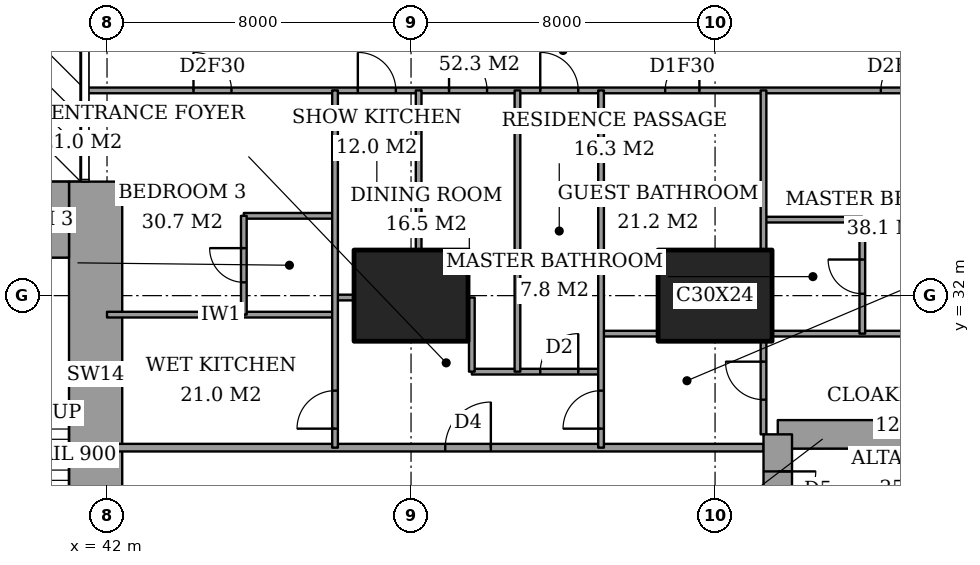
"""IFC4 building model, lengths in metres.
Left out: names, types, materials, properties, quantities, classifications, styles, units other than length and angle.
Written with IfcOpenShell. Run it as: python <this file> out.ifc"""

import sys

from ifc_helpers import new_model, si_unit, direction, frame, frame_2d, origin, origin_2d, place, context, subcontext, project, spatial, rectangle, extrude, element, fill, save


model = new_model("IFC4")
c1 = context("Model", 3, precision=1e-05, world=origin(), true_north=direction((0.0, 1.0)))
c2 = subcontext(c1, "Body", "Model", "MODEL_VIEW")
j1 = project(units=[si_unit("LENGTHUNIT", "METRE"), si_unit("PLANEANGLEUNIT", "RADIAN")], contexts=[c1])
p1 = place(None, origin())
s1 = spatial("IfcSite", under=j1, at=p1, CompositionType="ELEMENT")
p2 = place(p1, origin())
s2 = spatial("IfcBuilding", under=s1, at=p2, CompositionType="ELEMENT")
p3 = place(p2, frame((0.0, 0.0, 96.2)))
s3 = spatial("IfcBuildingStorey", under=s2, at=p3, CompositionType="ELEMENT", Elevation=96.2)
for number, where, z_axis, x_axis in (
    (1, (50.0, 32.0, 0.0), (0.0, 0.0, 1.0), (1.0, 0.0, 0.0)),
    (2, (58.0, 32.0, 0.0), (0.0, 0.0, 1.0), (1.0, 0.0, 0.0)),
):
    element("IfcColumn", number, at=place(p3, frame(where, z_axis=z_axis, x_axis=x_axis)), inside=s3, PredefinedType="COLUMN", context=c2, shape_type="SweptSolid", body=[
        extrude(rectangle(XDim=3.0, YDim=2.4, at=origin_2d()), origin(), (0.0, 0.0, 1.0), 3.6),
    ])
p4 = place(p3, frame((37.85, 34.0, 0.0), z_axis=(0.0, 0.0, 1.0), x_axis=(1.0, 0.0, 0.0)))
e3 = element("IfcWall", 3, at=p4, inside=s3, PredefinedType="SHEAR", context=c2, shape_type="SweptSolid", body=[
    extrude(rectangle(XDim=3.15, YDim=2.0, at=frame_2d((1.575, 0.0))), origin(), (0.0, 0.0, 1.0), 3.6),
])
p5 = place(p3, frame((41.7, 24.85, 0.0), z_axis=(0.0, 0.0, 1.0), x_axis=(0.0, 1.0, 0.0)))
e4 = element("IfcWall", 4, at=p5, inside=s3, PredefinedType="SHEAR", context=c2, shape_type="SweptSolid", body=[
    extrude(rectangle(XDim=10.15, YDim=1.4, at=frame_2d((5.075, 0.0))), origin(), (0.0, 0.0, 1.0), 3.6),
])
p6 = place(p3, frame((64.1, 28.35, 0.0), z_axis=(0.0, 0.0, 1.0), x_axis=(-1.0, 0.0, 0.0)))
e5 = element("IfcWall", 5, at=p6, inside=s3, PredefinedType="SHEAR", context=c2, shape_type="SweptSolid", body=[
    extrude(rectangle(XDim=4.45, YDim=0.75, at=frame_2d((2.225, 0.0))), origin(), (0.0, 0.0, 1.0), 3.6),
])
p7 = place(p3, frame((59.65, 28.35, 0.0), z_axis=(0.0, 0.0, 1.0), x_axis=(0.0, -1.0, 0.0)))
e6 = element("IfcWall", 6, at=p7, inside=s3, PredefinedType="SHEAR", context=c2, shape_type="SweptSolid", body=[
    extrude(rectangle(XDim=8.7, YDim=0.75, at=frame_2d((4.35, 0.0))), origin(), (0.0, 0.0, 1.0), 3.6),
])
p8 = place(p7, frame((0.975, 0.0, 0.0)))
e7 = element("IfcOpeningElement", 7, at=p8, cuts=e6, PredefinedType="OPENING", context=c2, shape_type="SweptSolid", body=[
    extrude(rectangle(XDim=1.0, YDim=2.1, at=frame_2d((0.5, 1.05))), frame((0.0, 0.385, 0.0), z_axis=(0.0, -1.0, 0.0), x_axis=(1.0, 0.0, 0.0)), (0.0, 0.0, 1.0), 0.77),
])
p9 = place(p3, frame((42.0, 28.0, 0.0), z_axis=(0.0, 0.0, 1.0), x_axis=(1.0, 0.0, 0.0)))
e8 = element("IfcWall", 8, at=p9, inside=s3, PredefinedType="PARTITIONING", context=c2, shape_type="SweptSolid", body=[
    extrude(rectangle(XDim=17.275, YDim=0.2, at=frame_2d((8.637, 0.0))), origin(), (0.0, 0.0, 1.0), 3.35),
])
p10 = place(p9, frame((8.9, 0.0, 0.0)))
e9 = element("IfcOpeningElement", 9, at=p10, cuts=e8, PredefinedType="OPENING", context=c2, shape_type="SweptSolid", body=[
    extrude(rectangle(XDim=1.2, YDim=2.4, at=frame_2d((0.6, 1.2))), frame((0.0, 0.11, 0.0), z_axis=(0.0, -1.0, 0.0), x_axis=(1.0, 0.0, 0.0)), (0.0, 0.0, 1.0), 0.22),
])
p11 = place(p3, frame((51.6, 30.0, 0.0), z_axis=(0.0, 0.0, 1.0), x_axis=(1.0, 0.0, 0.0)))
e10 = element("IfcWall", 10, at=p11, inside=s3, PredefinedType="PARTITIONING", context=c2, shape_type="SweptSolid", body=[
    extrude(rectangle(XDim=3.4, YDim=0.15, at=frame_2d((1.7, 0.0))), origin(), (0.0, 0.0, 1.0), 3.35),
])
p12 = place(p11, frame((1.8, 0.0, 0.0)))
e11 = element("IfcOpeningElement", 11, at=p12, cuts=e10, PredefinedType="OPENING", context=c2, shape_type="SweptSolid", body=[
    extrude(rectangle(XDim=1.0, YDim=2.1, at=frame_2d((0.5, 1.05))), frame((0.0, 0.085, 0.0), z_axis=(0.0, -1.0, 0.0), x_axis=(1.0, 0.0, 0.0)), (0.0, 0.0, 1.0), 0.17),
])
p13 = place(p3, frame((55.0, 31.0, 0.0), z_axis=(0.0, 0.0, 1.0), x_axis=(1.0, 0.0, 0.0)))
e12 = element("IfcWall", 12, at=p13, inside=s3, PredefinedType="PARTITIONING", context=c2, shape_type="SweptSolid", body=[
    extrude(rectangle(XDim=1.5, YDim=0.15, at=frame_2d((0.75, 0.0))), origin(), (0.0, 0.0, 1.0), 3.35),
])
p14 = place(p3, frame((59.5, 31.0, 0.0), z_axis=(0.0, 0.0, 1.0), x_axis=(1.0, 0.0, 0.0)))
e13 = element("IfcWall", 13, at=p14, inside=s3, PredefinedType="PARTITIONING", context=c2, shape_type="SweptSolid", body=[
    extrude(rectangle(XDim=5.15, YDim=0.15, at=frame_2d((2.575, 0.0))), origin(), (0.0, 0.0, 1.0), 3.35),
])
p15 = place(p3, frame((42.0, 31.5, 0.0), z_axis=(0.0, 0.0, 1.0), x_axis=(1.0, 0.0, 0.0)))
e14 = element("IfcWall", 14, at=p15, inside=s3, PredefinedType="PARTITIONING", context=c2, shape_type="SweptSolid", body=[
    extrude(rectangle(XDim=6.0, YDim=0.15, at=frame_2d((3.0, 0.0))), origin(), (0.0, 0.0, 1.0), 3.35),
])
p16 = place(p3, frame((48.0, 31.95, 0.0), z_axis=(0.0, 0.0, 1.0), x_axis=(1.0, 0.0, 0.0)))
e15 = element("IfcWall", 15, at=p16, inside=s3, PredefinedType="PARTITIONING", context=c2, shape_type="SweptSolid", body=[
    extrude(rectangle(XDim=0.5, YDim=0.15, at=frame_2d((0.25, 0.0))), origin(), (0.0, 0.0, 1.0), 2.634),
])
p17 = place(p3, frame((59.275, 34.0, 0.0), z_axis=(0.0, 0.0, 1.0), x_axis=(1.0, 0.0, 0.0)))
e16 = element("IfcWall", 16, at=p17, inside=s3, PredefinedType="PARTITIONING", context=c2, shape_type="SweptSolid", body=[
    extrude(rectangle(XDim=2.6, YDim=0.15, at=frame_2d((1.3, 0.0))), origin(), (0.0, 0.0, 1.0), 3.35),
])
p18 = place(p3, frame((45.6, 34.1, 0.0), z_axis=(0.0, 0.0, 1.0), x_axis=(1.0, 0.0, 0.0)))
e17 = element("IfcWall", 17, at=p18, inside=s3, PredefinedType="PARTITIONING", context=c2, shape_type="SweptSolid", body=[
    extrude(rectangle(XDim=2.4, YDim=0.15, at=frame_2d((1.2, 0.0))), origin(), (0.0, 0.0, 1.0), 3.35),
])
p19 = place(p3, frame((41.439, 37.4, 0.0), z_axis=(0.0, 0.0, 1.0), x_axis=(1.0, 0.0, 0.0)))
e18 = element("IfcWall", 18, at=p19, inside=s3, PredefinedType="PARTITIONING", context=c2, shape_type="SweptSolid", body=[
    extrude(rectangle(XDim=25.011, YDim=0.15, at=frame_2d((12.505, 0.0))), origin(), (0.0, 0.0, 1.0), 3.35),
])
p20 = place(p19, frame((11.961, 0.0, 0.0)))
e19 = element("IfcOpeningElement", 19, at=p20, cuts=e18, PredefinedType="OPENING", context=c2, shape_type="SweptSolid", body=[
    extrude(rectangle(XDim=1.0, YDim=2.1, at=frame_2d((0.5, 1.05))), frame((0.0, 0.085, 0.0), z_axis=(0.0, -1.0, 0.0), x_axis=(1.0, 0.0, 0.0)), (0.0, 0.0, 1.0), 0.17),
])
p21 = place(p19, frame((20.924, 0.0, 0.0)))
e20 = element("IfcOpeningElement", 20, at=p21, cuts=e18, PredefinedType="OPENING", context=c2, shape_type="SweptSolid", body=[
    extrude(rectangle(XDim=1.0, YDim=2.1, at=frame_2d((0.5, 1.05))), frame((0.0, 0.085, 0.0), z_axis=(0.0, -1.0, 0.0), x_axis=(1.0, 0.0, 0.0)), (0.0, 0.0, 1.0), 0.17),
])
p22 = place(p19, frame((15.249, 0.0, 0.0)))
e21 = element("IfcOpeningElement", 21, at=p22, cuts=e18, PredefinedType="OPENING", context=c2, shape_type="SweptSolid", body=[
    extrude(rectangle(XDim=0.9, YDim=2.1, at=frame_2d((0.45, 1.05))), frame((0.0, 0.085, 0.0), z_axis=(0.0, -1.0, 0.0), x_axis=(1.0, 0.0, 0.0)), (0.0, 0.0, 1.0), 0.17),
])
p23 = place(p19, frame((9.561, 0.0, 0.0)))
e22 = element("IfcOpeningElement", 22, at=p23, cuts=e18, PredefinedType="OPENING", context=c2, shape_type="SweptSolid", body=[
    extrude(rectangle(XDim=1.0, YDim=2.1, at=frame_2d((0.5, 1.05))), frame((0.0, 0.085, 0.0), z_axis=(0.0, -1.0, 0.0), x_axis=(1.0, 0.0, 0.0)), (0.0, 0.0, 1.0), 0.17),
])
p24 = place(p19, frame((7.161, 0.0, 0.0)))
e23 = element("IfcOpeningElement", 23, at=p24, cuts=e18, PredefinedType="OPENING", context=c2, shape_type="SweptSolid", body=[
    extrude(rectangle(XDim=1.0, YDim=2.1, at=frame_2d((0.5, 1.05))), frame((0.0, 0.085, 0.0), z_axis=(0.0, -1.0, 0.0), x_axis=(1.0, 0.0, 0.0)), (0.0, 0.0, 1.0), 0.17),
])
p25 = place(p19, frame((2.836, 0.0, 0.0)))
e24 = element("IfcOpeningElement", 24, at=p25, cuts=e18, PredefinedType="OPENING", context=c2, shape_type="SweptSolid", body=[
    extrude(rectangle(XDim=1.0, YDim=2.1, at=frame_2d((0.5, 1.05))), frame((0.0, 0.085, 0.0), z_axis=(0.0, -1.0, 0.0), x_axis=(1.0, 0.0, 0.0)), (0.0, 0.0, 1.0), 0.17),
])
p26 = place(p3, frame((45.6, 31.5, 0.0), z_axis=(0.0, 0.0, 1.0), x_axis=(0.0, 1.0, 0.0)))
e25 = element("IfcWall", 25, at=p26, inside=s3, PredefinedType="PARTITIONING", context=c2, shape_type="SweptSolid", body=[
    extrude(rectangle(XDim=2.6, YDim=0.15, at=frame_2d((1.3, 0.0))), origin(), (0.0, 0.0, 1.0), 3.35),
])
p27 = place(p26, frame((0.85, 0.0, 0.0)))
e26 = element("IfcOpeningElement", 26, at=p27, cuts=e25, PredefinedType="OPENING", context=c2, shape_type="SweptSolid", body=[
    extrude(rectangle(XDim=0.9, YDim=2.1, at=frame_2d((0.45, 1.05))), frame((0.0, 0.085, 0.0), z_axis=(0.0, -1.0, 0.0), x_axis=(1.0, 0.0, 0.0)), (0.0, 0.0, 1.0), 0.17),
])
p28 = place(p3, frame((48.0, 28.0, 0.0), z_axis=(0.0, 0.0, 1.0), x_axis=(0.0, 1.0, 0.0)))
e27 = element("IfcWall", 27, at=p28, inside=s3, PredefinedType="PARTITIONING", context=c2, shape_type="SweptSolid", body=[
    extrude(rectangle(XDim=9.4, YDim=0.15, at=frame_2d((4.7, 0.0))), origin(), (0.0, 0.0, 1.0), 3.35),
])
p29 = place(p28, frame((0.5, 0.0, 0.0)))
e28 = element("IfcOpeningElement", 28, at=p29, cuts=e27, PredefinedType="OPENING", context=c2, shape_type="SweptSolid", body=[
    extrude(rectangle(XDim=1.0, YDim=2.1, at=frame_2d((0.5, 1.05))), frame((0.0, 0.085, 0.0), z_axis=(0.0, -1.0, 0.0), x_axis=(1.0, 0.0, 0.0)), (0.0, 0.0, 1.0), 0.17),
])
p30 = place(p3, frame((50.2, 33.2, 0.0), z_axis=(0.0, 0.0, 1.0), x_axis=(0.0, 1.0, 0.0)))
e29 = element("IfcWall", 29, at=p30, inside=s3, PredefinedType="PARTITIONING", context=c2, shape_type="SweptSolid", body=[
    extrude(rectangle(XDim=4.2, YDim=0.15, at=frame_2d((2.1, 0.0))), origin(), (0.0, 0.0, 1.0), 3.35),
])
p31 = place(p3, frame((51.6, 30.0, 0.0), z_axis=(0.0, 0.0, 1.0), x_axis=(0.0, 1.0, 0.0)))
e30 = element("IfcWall", 30, at=p31, inside=s3, PredefinedType="PARTITIONING", context=c2, shape_type="SweptSolid", body=[
    extrude(rectangle(XDim=1.95, YDim=0.15, at=frame_2d((0.975, 0.0))), origin(), (0.0, 0.0, 1.0), 3.35),
])
p32 = place(p3, frame((52.8, 30.0, 0.0), z_axis=(0.0, 0.0, 1.0), x_axis=(0.0, 1.0, 0.0)))
e31 = element("IfcWall", 31, at=p32, inside=s3, PredefinedType="PARTITIONING", context=c2, shape_type="SweptSolid", body=[
    extrude(rectangle(XDim=7.4, YDim=0.15, at=frame_2d((3.7, 0.0))), origin(), (0.0, 0.0, 1.0), 3.35),
])
p33 = place(p3, frame((55.0, 28.0, 0.0), z_axis=(0.0, 0.0, 1.0), x_axis=(0.0, 1.0, 0.0)))
e32 = element("IfcWall", 32, at=p33, inside=s3, PredefinedType="PARTITIONING", context=c2, shape_type="SweptSolid", body=[
    extrude(rectangle(XDim=9.4, YDim=0.15, at=frame_2d((4.7, 0.0))), origin(), (0.0, 0.0, 1.0), 3.35),
])
p34 = place(p33, frame((0.5, 0.0, 0.0)))
e33 = element("IfcOpeningElement", 33, at=p34, cuts=e32, PredefinedType="OPENING", context=c2, shape_type="SweptSolid", body=[
    extrude(rectangle(XDim=1.0, YDim=2.1, at=frame_2d((0.5, 1.05))), frame((0.0, 0.085, 0.0), z_axis=(0.0, -1.0, 0.0), x_axis=(1.0, 0.0, 0.0)), (0.0, 0.0, 1.0), 0.17),
])
p35 = place(p3, frame((59.275, 28.35, 0.0), z_axis=(0.0, 0.0, 1.0), x_axis=(0.0, 1.0, 0.0)))
e34 = element("IfcWall", 34, at=p35, inside=s3, PredefinedType="PARTITIONING", context=c2, shape_type="SweptSolid", body=[
    extrude(rectangle(XDim=2.45, YDim=0.15, at=frame_2d((1.225, 0.0))), origin(), (0.0, 0.0, 1.0), 3.35),
])
p36 = place(p35, frame((0.913, 0.0, 0.0)))
e35 = element("IfcOpeningElement", 35, at=p36, cuts=e34, PredefinedType="OPENING", context=c2, shape_type="SweptSolid", body=[
    extrude(rectangle(XDim=1.0, YDim=2.1, at=frame_2d((0.5, 1.05))), frame((0.0, 0.085, 0.0), z_axis=(0.0, -1.0, 0.0), x_axis=(1.0, 0.0, 0.0)), (0.0, 0.0, 1.0), 0.17),
])
p37 = place(p3, frame((59.275, 33.2, 0.0), z_axis=(0.0, 0.0, 1.0), x_axis=(0.0, 1.0, 0.0)))
e36 = element("IfcWall", 36, at=p37, inside=s3, PredefinedType="PARTITIONING", context=c2, shape_type="SweptSolid", body=[
    extrude(rectangle(XDim=4.2, YDim=0.15, at=frame_2d((2.1, 0.0))), origin(), (0.0, 0.0, 1.0), 3.35),
])
p38 = place(p3, frame((61.875, 31.0, 0.0), z_axis=(0.0, 0.0, 1.0), x_axis=(0.0, 1.0, 0.0)))
e37 = element("IfcWall", 37, at=p38, inside=s3, PredefinedType="PARTITIONING", context=c2, shape_type="SweptSolid", body=[
    extrude(rectangle(XDim=3.0, YDim=0.15, at=frame_2d((1.5, 0.0))), origin(), (0.0, 0.0, 1.0), 3.35),
])
p39 = place(p38, frame((1.05, 0.0, 0.0)))
e38 = element("IfcOpeningElement", 38, at=p39, cuts=e37, PredefinedType="OPENING", context=c2, shape_type="SweptSolid", body=[
    extrude(rectangle(XDim=0.9, YDim=2.1, at=frame_2d((0.45, 1.05))), frame((0.0, 0.085, 0.0), z_axis=(0.0, -1.0, 0.0), x_axis=(1.0, 0.0, 0.0)), (0.0, 0.0, 1.0), 0.17),
])
p40 = place(p20, origin())
e39 = element("IfcDoor", 39, at=p40, inside=s3, OperationType="SINGLE_SWING_RIGHT", PredefinedType="DOOR", context=c2, shape_type="SweptSolid", body=[
    extrude(rectangle(XDim=1.0, YDim=2.1, at=frame_2d((0.5, 1.05))), frame((0.0, 0.025, 0.0), z_axis=(0.0, -1.0, 0.0), x_axis=(1.0, 0.0, 0.0)), (0.0, 0.0, 1.0), 0.05),
])
fill(e19, e39)
p41 = place(p39, origin())
e40 = element("IfcDoor", 40, at=p41, inside=s3, OperationType="SINGLE_SWING_LEFT", PredefinedType="DOOR", context=c2, shape_type="SweptSolid", body=[
    extrude(rectangle(XDim=0.9, YDim=2.1, at=frame_2d((0.45, 1.05))), frame((0.0, 0.025, 0.0), z_axis=(0.0, -1.0, 0.0), x_axis=(1.0, 0.0, 0.0)), (0.0, 0.0, 1.0), 0.05),
])
fill(e38, e40)
p42 = place(p21, origin())
e41 = element("IfcDoor", 41, at=p42, inside=s3, OperationType="SINGLE_SWING_LEFT", PredefinedType="DOOR", context=c2, shape_type="SweptSolid", body=[
    extrude(rectangle(XDim=1.0, YDim=2.1, at=frame_2d((0.5, 1.05))), frame((0.0, 0.025, 0.0), z_axis=(0.0, -1.0, 0.0), x_axis=(1.0, 0.0, 0.0)), (0.0, 0.0, 1.0), 0.05),
])
fill(e20, e41)
p43 = place(p36, origin())
e42 = element("IfcDoor", 42, at=p43, inside=s3, OperationType="SINGLE_SWING_LEFT", PredefinedType="DOOR", context=c2, shape_type="SweptSolid", body=[
    extrude(rectangle(XDim=1.0, YDim=2.1, at=frame_2d((0.5, 1.05))), frame((0.0, 0.025, 0.0), z_axis=(0.0, -1.0, 0.0), x_axis=(1.0, 0.0, 0.0)), (0.0, 0.0, 1.0), 0.05),
])
fill(e35, e42)
p44 = place(p22, origin())
e43 = element("IfcDoor", 43, at=p44, inside=s3, OperationType="SINGLE_SWING_LEFT", PredefinedType="DOOR", context=c2, shape_type="SweptSolid", body=[
    extrude(rectangle(XDim=0.9, YDim=2.1, at=frame_2d((0.45, 1.05))), frame((0.0, 0.025, 0.0), z_axis=(0.0, -1.0, 0.0), x_axis=(1.0, 0.0, 0.0)), (0.0, 0.0, 1.0), 0.05),
])
fill(e21, e43)
p45 = place(p34, origin())
e44 = element("IfcDoor", 44, at=p45, inside=s3, OperationType="SINGLE_SWING_RIGHT", PredefinedType="DOOR", context=c2, shape_type="SweptSolid", body=[
    extrude(rectangle(XDim=1.0, YDim=2.1, at=frame_2d((0.5, 1.05))), frame((0.0, 0.025, 0.0), z_axis=(0.0, -1.0, 0.0), x_axis=(1.0, 0.0, 0.0)), (0.0, 0.0, 1.0), 0.05),
])
fill(e33, e44)
p46 = place(p10, origin())
e45 = element("IfcDoor", 45, at=p46, inside=s3, OperationType="SINGLE_SWING_LEFT", PredefinedType="DOOR", context=c2, shape_type="SweptSolid", body=[
    extrude(rectangle(XDim=1.2, YDim=2.4, at=frame_2d((0.6, 1.2))), frame((0.0, 0.025, 0.0), z_axis=(0.0, -1.0, 0.0), x_axis=(1.0, 0.0, 0.0)), (0.0, 0.0, 1.0), 0.05),
])
fill(e9, e45)
p47 = place(p12, origin())
e46 = element("IfcDoor", 46, at=p47, inside=s3, OperationType="SINGLE_SWING_LEFT", PredefinedType="DOOR", context=c2, shape_type="SweptSolid", body=[
    extrude(rectangle(XDim=1.0, YDim=2.1, at=frame_2d((0.5, 1.05))), frame((0.0, 0.025, 0.0), z_axis=(0.0, -1.0, 0.0), x_axis=(1.0, 0.0, 0.0)), (0.0, 0.0, 1.0), 0.05),
])
fill(e11, e46)
p48 = place(p23, origin())
e47 = element("IfcDoor", 47, at=p48, inside=s3, OperationType="SINGLE_SWING_RIGHT", PredefinedType="DOOR", context=c2, shape_type="SweptSolid", body=[
    extrude(rectangle(XDim=1.0, YDim=2.1, at=frame_2d((0.5, 1.05))), frame((0.0, 0.025, 0.0), z_axis=(0.0, -1.0, 0.0), x_axis=(1.0, 0.0, 0.0)), (0.0, 0.0, 1.0), 0.05),
])
fill(e22, e47)
p49 = place(p24, origin())
e48 = element("IfcDoor", 48, at=p49, inside=s3, OperationType="SINGLE_SWING_RIGHT", PredefinedType="DOOR", context=c2, shape_type="SweptSolid", body=[
    extrude(rectangle(XDim=1.0, YDim=2.1, at=frame_2d((0.5, 1.05))), frame((0.0, 0.025, 0.0), z_axis=(0.0, -1.0, 0.0), x_axis=(1.0, 0.0, 0.0)), (0.0, 0.0, 1.0), 0.05),
])
fill(e23, e48)
p50 = place(p27, origin())
e49 = element("IfcDoor", 49, at=p50, inside=s3, OperationType="SINGLE_SWING_LEFT", PredefinedType="DOOR", context=c2, shape_type="SweptSolid", body=[
    extrude(rectangle(XDim=0.9, YDim=2.1, at=frame_2d((0.45, 1.05))), frame((0.0, 0.025, 0.0), z_axis=(0.0, -1.0, 0.0), x_axis=(1.0, 0.0, 0.0)), (0.0, 0.0, 1.0), 0.05),
])
fill(e26, e49)
p51 = place(p25, origin())
e50 = element("IfcDoor", 50, at=p51, inside=s3, OperationType="SINGLE_SWING_RIGHT", PredefinedType="DOOR", context=c2, shape_type="SweptSolid", body=[
    extrude(rectangle(XDim=1.0, YDim=2.1, at=frame_2d((0.5, 1.05))), frame((0.0, 0.025, 0.0), z_axis=(0.0, -1.0, 0.0), x_axis=(1.0, 0.0, 0.0)), (0.0, 0.0, 1.0), 0.05),
])
fill(e24, e50)
p52 = place(p29, origin())
e51 = element("IfcDoor", 51, at=p52, inside=s3, OperationType="SINGLE_SWING_RIGHT", PredefinedType="DOOR", context=c2, shape_type="SweptSolid", body=[
    extrude(rectangle(XDim=1.0, YDim=2.1, at=frame_2d((0.5, 1.05))), frame((0.0, 0.025, 0.0), z_axis=(0.0, -1.0, 0.0), x_axis=(1.0, 0.0, 0.0)), (0.0, 0.0, 1.0), 0.05),
])
fill(e28, e51)
p53 = place(p8, origin())
e52 = element("IfcDoor", 52, at=p53, inside=s3, OperationType="SINGLE_SWING_RIGHT", PredefinedType="DOOR", context=c2, shape_type="SweptSolid", body=[
    extrude(rectangle(XDim=1.0, YDim=2.1, at=frame_2d((0.5, 1.05))), frame((0.0, 0.025, 0.0), z_axis=(0.0, -1.0, 0.0), x_axis=(1.0, 0.0, 0.0)), (0.0, 0.0, 1.0), 0.05),
])
fill(e7, e52)
save(model, sys.argv[1])
